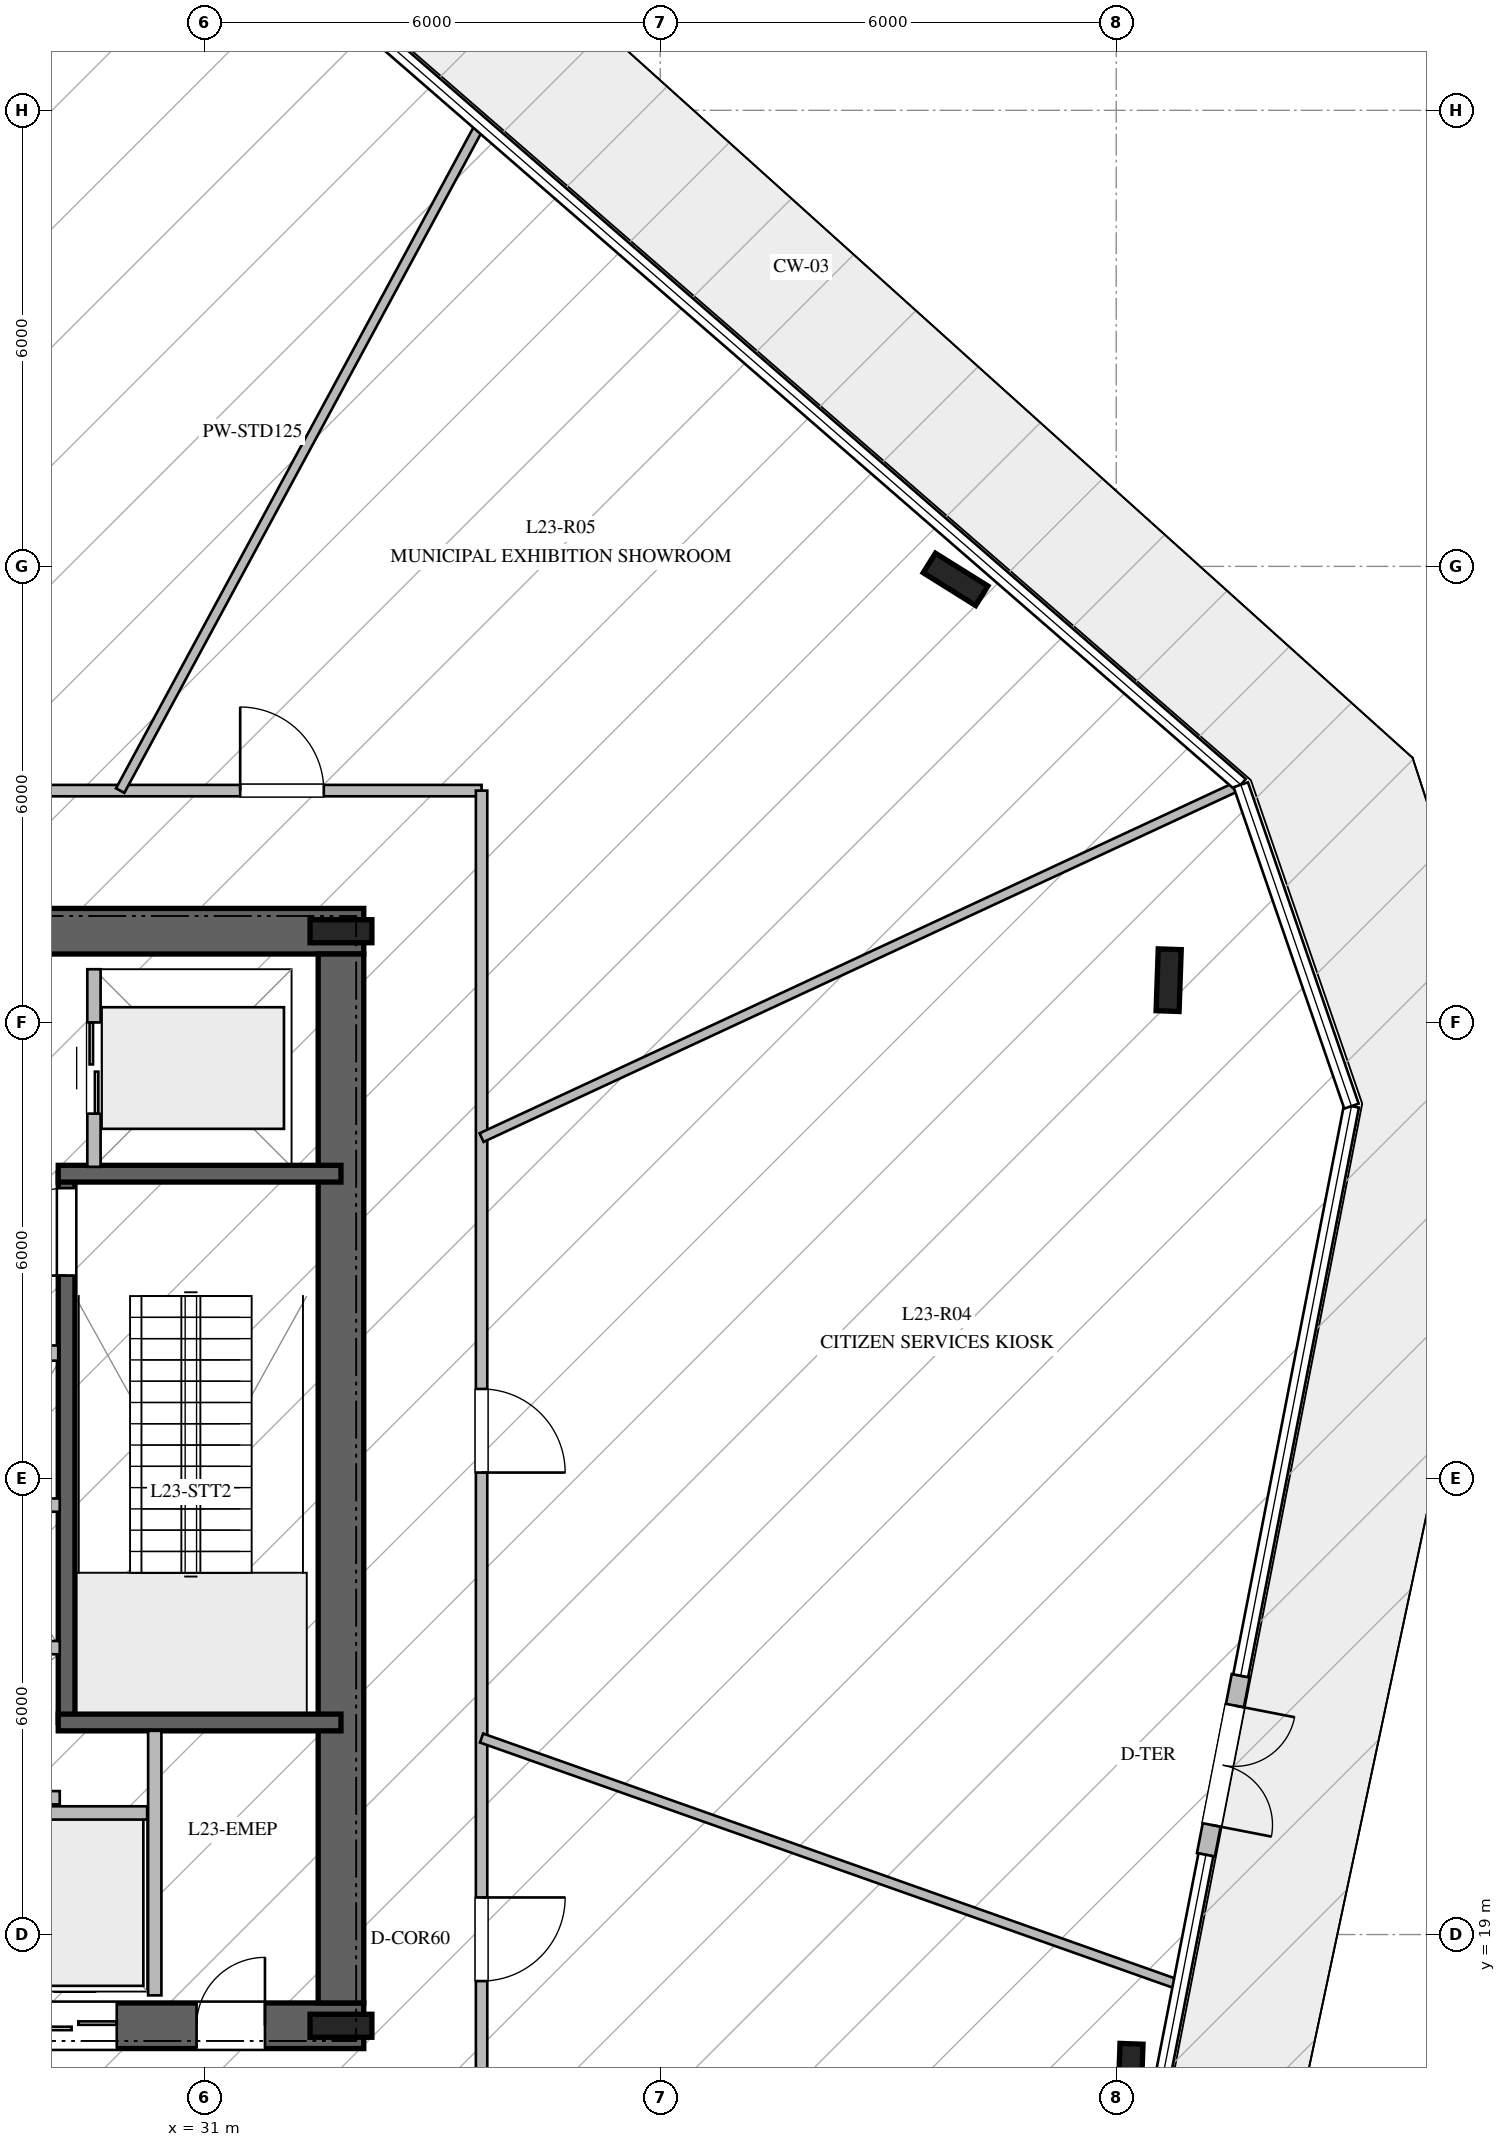
"""IFC4 building model, lengths in metres.
Left out: names, types, materials, properties, quantities, classifications, styles, units other than length and angle.
Written with IfcOpenShell. Run it as: python <this file> out.ifc"""

import sys

from ifc_helpers import new_model, si_unit, direction, frame, frame_2d, origin, origin_2d, place, context, subcontext, project, spatial, rectangle, i_section, extrude, element, fill, save


model = new_model("IFC4")
c1 = context("Model", 3, precision=1e-05, world=origin(), true_north=direction((0.0, 1.0)))
c2 = subcontext(c1, "Body", "Model", "MODEL_VIEW")
j1 = project(units=[si_unit("LENGTHUNIT", "METRE"), si_unit("PLANEANGLEUNIT", "RADIAN")], contexts=[c1])
p1 = place(None, origin())
s1 = spatial("IfcSite", under=j1, at=p1, CompositionType="ELEMENT")
p2 = place(p1, origin())
s2 = spatial("IfcBuilding", under=s1, at=p2, CompositionType="ELEMENT")
p3 = place(p2, frame((0.0, 0.0, 97.4)))
s3 = spatial("IfcBuildingStorey", under=s2, at=p3, CompositionType="ELEMENT", Elevation=97.4)
p4 = place(p3, frame((16.9, 17.8, 0.0), z_axis=(0.0, 0.0, 1.0), x_axis=(1.0, 0.0, 0.0)))
e1 = element("IfcWall", 1, at=p4, inside=s3, PredefinedType="SHEAR", context=c2, shape_type="SweptSolid", body=[
    extrude(rectangle(XDim=16.2, YDim=0.6, at=frame_2d((8.1, 0.0))), origin(), (0.0, 0.0, 1.0), 4.76),
])
p5 = place(p4, frame((5.05, 0.0, 0.0)))
e2 = element("IfcOpeningElement", 2, at=p5, cuts=e1, PredefinedType="OPENING", context=c2, shape_type="SweptSolid", body=[
    extrude(rectangle(XDim=1.2, YDim=2.25, at=frame_2d((0.6, 1.125))), frame((0.0, 0.31, 0.0), z_axis=(0.0, -1.0, 0.0), x_axis=(1.0, 0.0, 0.0)), (0.0, 0.0, 1.0), 0.62),
])
p6 = place(p4, frame((14.0, 0.0, 0.0)))
e3 = element("IfcOpeningElement", 3, at=p6, cuts=e1, PredefinedType="OPENING", context=c2, shape_type="SweptSolid", body=[
    extrude(rectangle(XDim=0.9, YDim=2.1, at=frame_2d((0.45, 1.05))), frame((0.0, 0.31, 0.0), z_axis=(0.0, -1.0, 0.0), x_axis=(1.0, 0.0, 0.0)), (0.0, 0.0, 1.0), 0.62),
])
p7 = place(p4, frame((7.9, 0.0, 0.0)))
e4 = element("IfcOpeningElement", 4, at=p7, cuts=e1, PredefinedType="OPENING", context=c2, shape_type="SweptSolid", body=[
    extrude(rectangle(XDim=1.1, YDim=2.2, at=frame_2d((0.55, 1.1))), frame((0.0, 0.31, 0.0), z_axis=(0.0, -1.0, 0.0), x_axis=(1.0, 0.0, 0.0)), (0.0, 0.0, 1.0), 0.62),
])
p8 = place(p4, frame((9.875, 0.0, 0.0)))
e5 = element("IfcOpeningElement", 5, at=p8, cuts=e1, PredefinedType="OPENING", context=c2, shape_type="SweptSolid", body=[
    extrude(rectangle(XDim=1.1, YDim=2.2, at=frame_2d((0.55, 1.1))), frame((0.0, 0.31, 0.0), z_axis=(0.0, -1.0, 0.0), x_axis=(1.0, 0.0, 0.0)), (0.0, 0.0, 1.0), 0.62),
])
p9 = place(p4, frame((11.85, 0.0, 0.0)))
e6 = element("IfcOpeningElement", 6, at=p9, cuts=e1, PredefinedType="OPENING", context=c2, shape_type="SweptSolid", body=[
    extrude(rectangle(XDim=1.1, YDim=2.2, at=frame_2d((0.55, 1.1))), frame((0.0, 0.31, 0.0), z_axis=(0.0, -1.0, 0.0), x_axis=(1.0, 0.0, 0.0)), (0.0, 0.0, 1.0), 0.62),
])
p10 = place(p3, frame((33.1, 32.2, 0.0), z_axis=(0.0, 0.0, 1.0), x_axis=(-1.0, 0.0, 0.0)))
e7 = element("IfcWall", 7, at=p10, inside=s3, PredefinedType="SHEAR", context=c2, shape_type="SweptSolid", body=[
    extrude(rectangle(XDim=16.2, YDim=0.6, at=frame_2d((8.1, 0.0))), origin(), (0.0, 0.0, 1.0), 4.76),
])
p11 = place(p10, frame((5.05, 0.0, 0.0)))
e8 = element("IfcOpeningElement", 8, at=p11, cuts=e7, PredefinedType="OPENING", context=c2, shape_type="SweptSolid", body=[
    extrude(rectangle(XDim=1.2, YDim=2.25, at=frame_2d((0.6, 1.125))), frame((0.0, 0.31, 0.0), z_axis=(0.0, -1.0, 0.0), x_axis=(1.0, 0.0, 0.0)), (0.0, 0.0, 1.0), 0.62),
])
p12 = place(p10, frame((11.85, 0.0, 0.0)))
e9 = element("IfcOpeningElement", 9, at=p12, cuts=e7, PredefinedType="OPENING", context=c2, shape_type="SweptSolid", body=[
    extrude(rectangle(XDim=1.1, YDim=2.2, at=frame_2d((0.55, 1.1))), frame((0.0, 0.31, 0.0), z_axis=(0.0, -1.0, 0.0), x_axis=(1.0, 0.0, 0.0)), (0.0, 0.0, 1.0), 0.62),
])
p13 = place(p10, frame((9.875, 0.0, 0.0)))
e10 = element("IfcOpeningElement", 10, at=p13, cuts=e7, PredefinedType="OPENING", context=c2, shape_type="SweptSolid", body=[
    extrude(rectangle(XDim=1.1, YDim=2.2, at=frame_2d((0.55, 1.1))), frame((0.0, 0.31, 0.0), z_axis=(0.0, -1.0, 0.0), x_axis=(1.0, 0.0, 0.0)), (0.0, 0.0, 1.0), 0.62),
])
p14 = place(p10, frame((7.9, 0.0, 0.0)))
e11 = element("IfcOpeningElement", 11, at=p14, cuts=e7, PredefinedType="OPENING", context=c2, shape_type="SweptSolid", body=[
    extrude(rectangle(XDim=1.1, YDim=2.2, at=frame_2d((0.55, 1.1))), frame((0.0, 0.31, 0.0), z_axis=(0.0, -1.0, 0.0), x_axis=(1.0, 0.0, 0.0)), (0.0, 0.0, 1.0), 0.62),
])
p15 = place(p3, frame((32.8, 18.1, 0.0), z_axis=(0.0, 0.0, 1.0), x_axis=(0.0, 1.0, 0.0)))
e12 = element("IfcWall", 12, at=p15, inside=s3, PredefinedType="SHEAR", context=c2, shape_type="SweptSolid", body=[
    extrude(rectangle(XDim=13.8, YDim=0.6, at=frame_2d((6.9, 0.0))), origin(), (0.0, 0.0, 1.0), 4.76),
])
for number, where, z_axis, x_axis in (
    (13, (32.8, 17.8, 0.0), (0.0, 0.0, 1.0), (1.0, 0.0, 0.0)),
    (14, (32.8, 32.2, 0.0), (0.0, 0.0, 1.0), (1.0, 0.0, 0.0)),
):
    element("IfcColumn", number, at=place(p3, frame(where, z_axis=z_axis, x_axis=x_axis)), inside=s3, PredefinedType="COLUMN", context=c2, shape_type="SweptSolid", body=[
        extrude(i_section(OverallWidth=0.303, OverallDepth=0.814, WebThickness=0.021, FlangeThickness=0.04, at=origin_2d()), origin(), (0.0, 0.0, 1.0), 5.0),
    ])
p16 = place(p3, frame((29.19, 21.79, 0.0), z_axis=(0.0, 0.0, 1.0), x_axis=(0.0, 1.0, 0.0)))
e15 = element("IfcWall", 15, at=p16, inside=s3, PredefinedType="SOLIDWALL", context=c2, shape_type="SweptSolid", body=[
    extrude(rectangle(XDim=7.22, YDim=0.22, at=frame_2d((3.61, 0.0))), origin(), (0.0, 0.0, 1.0), 4.76),
])
p17 = place(p16, frame((5.88, 0.0, 0.0)))
e16 = element("IfcOpeningElement", 16, at=p17, cuts=e15, PredefinedType="OPENING", context=c2, shape_type="SweptSolid", body=[
    extrude(rectangle(XDim=1.15, YDim=2.2, at=frame_2d((0.575, 1.1))), frame((0.0, 0.12, 0.0), z_axis=(0.0, -1.0, 0.0), x_axis=(1.0, 0.0, 0.0)), (0.0, 0.0, 1.0), 0.24),
])
for number, where, z_axis, x_axis in (
    (17, (29.08, 21.79, 0.0), (0.0, 0.0, 1.0), (1.0, 0.0, 0.0)),
    (18, (29.08, 29.01, 0.0), (0.0, 0.0, 1.0), (1.0, 0.0, 0.0)),
):
    element("IfcWall", number, at=place(p3, frame(where, z_axis=z_axis, x_axis=x_axis)), inside=s3, PredefinedType="SOLIDWALL", context=c2, shape_type="SweptSolid", body=[
        extrude(rectangle(XDim=3.72, YDim=0.22, at=frame_2d((1.86, 0.0))), origin(), (0.0, 0.0, 1.0), 4.76),
    ])
for number, where, z_axis, x_axis in (
    (19, (40.886, 36.829, -0.27), (0.0, 0.0, 1.0), (-0.848, 0.53, 0.0)),
    (20, (43.187, 17.156, -0.27), (0.0, 0.0, 1.0), (0.035, 0.999, 0.0)),
    (21, (43.69, 31.556, -0.27), (0.0, 0.0, 1.0), (0.035, 0.999, 0.0)),
):
    element("IfcColumn", number, at=place(p3, frame(where, z_axis=z_axis, x_axis=x_axis)), inside=s3, PredefinedType="COLUMN", context=c2, shape_type="SweptSolid", body=[
        extrude(i_section(OverallWidth=0.303, OverallDepth=0.814, WebThickness=0.021, FlangeThickness=0.04, at=origin_2d()), origin(), (0.0, 0.0, 1.0), 5.27),
    ])
p18 = place(p3, frame((44.18, 20.049, 0.0), z_axis=(0.0, 0.0, 1.0), x_axis=(0.190831541356, 0.981622800685, 0.0)))
e22 = element("IfcWall", 22, at=p18, inside=s3, PredefinedType="STANDARD", context=c2, shape_type="SweptSolid", body=[
    extrude(rectangle(XDim=2.4, YDim=0.24, at=frame_2d((1.2, 0.0))), origin(), (0.0, 0.0, 1.0), 4.76),
])
p19 = place(p18, frame((0.4, 0.0, 0.0)))
e23 = element("IfcOpeningElement", 23, at=p19, cuts=e22, PredefinedType="OPENING", context=c2, shape_type="SweptSolid", body=[
    extrude(rectangle(XDim=1.6, YDim=2.25, at=frame_2d((0.8, 1.125))), frame((0.0, 0.13, 0.0), z_axis=(0.0, -1.0, 0.0), x_axis=(1.0, 0.0, 0.0)), (0.0, 0.0, 1.0), 0.26),
])
p20 = place(p3, frame((25.7, 26.65, 0.0), z_axis=(0.0, 0.0, 1.0), x_axis=(1.0, 0.0, 0.0)))
e24 = element("IfcWall", 24, at=p20, inside=s3, PredefinedType="PARTITIONING", context=c2, shape_type="SweptSolid", body=[
    extrude(rectangle(XDim=3.38, YDim=0.2, at=frame_2d((1.69, 0.0))), origin(), (0.0, 0.0, 1.0), 4.76),
])
p21 = place(p3, frame((30.35, 18.2, 0.0), z_axis=(0.0, 0.0, 1.0), x_axis=(0.0, 1.0, 0.0)))
e25 = element("IfcWall", 25, at=p21, inside=s3, PredefinedType="PARTITIONING", context=c2, shape_type="SweptSolid", body=[
    extrude(rectangle(XDim=3.48, YDim=0.175, at=frame_2d((1.74, 0.0))), origin(), (0.0, 0.0, 1.0), 4.76),
])
p22 = place(p3, frame((28.35, 20.6, 0.0), z_axis=(0.0, 0.0, 1.0), x_axis=(1.0, 0.0, 0.0)))
e26 = element("IfcWall", 26, at=p22, inside=s3, PredefinedType="PARTITIONING", context=c2, shape_type="SweptSolid", body=[
    extrude(rectangle(XDim=1.9, YDim=0.175, at=frame_2d((0.95, 0.0))), origin(), (0.0, 0.0, 1.0), 4.76),
])
for number, where, z_axis, x_axis in (
    (27, (26.75, 20.8, 0.0), (0.0, 0.0, 1.0), (1.0, 0.0, 0.0)),
    (28, (26.75, 22.775, 0.0), (0.0, 0.0, 1.0), (1.0, 0.0, 0.0)),
    (29, (26.75, 24.65, 0.0), (0.0, 0.0, 1.0), (1.0, 0.0, 0.0)),
):
    element("IfcWall", number, at=place(p3, frame(where, z_axis=z_axis, x_axis=x_axis)), inside=s3, PredefinedType="PARTITIONING", context=c2, shape_type="SweptSolid", body=[
        extrude(rectangle(XDim=2.35, YDim=0.175, at=frame_2d((1.175, 0.0))), origin(), (0.0, 0.0, 1.0), 4.76),
    ])
p23 = place(p3, frame((29.55, 29.1, 0.0), z_axis=(0.0, 0.0, 1.0), x_axis=(0.0, 1.0, 0.0)))
e30 = element("IfcWall", 30, at=p23, inside=s3, PredefinedType="PARTITIONING", context=c2, shape_type="SweptSolid", body=[
    extrude(rectangle(XDim=2.6, YDim=0.175, at=frame_2d((1.3, 0.0))), origin(), (0.0, 0.0, 1.0), 4.76),
])
p24 = place(p23, frame((0.7, 0.0, 0.0)))
e31 = element("IfcOpeningElement", 31, at=p24, cuts=e30, PredefinedType="OPENING", context=c2, shape_type="SweptSolid", body=[
    extrude(rectangle(XDim=1.2, YDim=2.2, at=frame_2d((0.6, 1.1))), frame((0.0, 0.098, 0.0), z_axis=(0.0, -1.0, 0.0), x_axis=(1.0, 0.0, 0.0)), (0.0, 0.0, 1.0), 0.195),
])
p25 = place(p3, frame((15.35, 34.05, 0.0), z_axis=(0.0, 0.0, 1.0), x_axis=(1.0, 0.0, 0.0)))
e32 = element("IfcWall", 32, at=p25, inside=s3, PredefinedType="PARTITIONING", context=c2, shape_type="SweptSolid", body=[
    extrude(rectangle(XDim=19.3, YDim=0.15, at=frame_2d((9.65, 0.0))), origin(), (0.0, 0.0, 1.0), 4.21),
])
p26 = place(p25, frame((16.124, 0.0, 0.0)))
e33 = element("IfcOpeningElement", 33, at=p26, cuts=e32, PredefinedType="OPENING", context=c2, shape_type="SweptSolid", body=[
    extrude(rectangle(XDim=1.1, YDim=2.2, at=frame_2d((0.55, 1.1))), frame((0.0, 0.085, 0.0), z_axis=(0.0, -1.0, 0.0), x_axis=(1.0, 0.0, 0.0)), (0.0, 0.0, 1.0), 0.17),
])
p27 = place(p25, frame((9.194, 0.0, 0.0)))
e34 = element("IfcOpeningElement", 34, at=p27, cuts=e32, PredefinedType="OPENING", context=c2, shape_type="SweptSolid", body=[
    extrude(rectangle(XDim=1.1, YDim=2.2, at=frame_2d((0.55, 1.1))), frame((0.0, 0.085, 0.0), z_axis=(0.0, -1.0, 0.0), x_axis=(1.0, 0.0, 0.0)), (0.0, 0.0, 1.0), 0.17),
])
p28 = place(p25, frame((2.083, 0.0, 0.0)))
e35 = element("IfcOpeningElement", 35, at=p28, cuts=e32, PredefinedType="OPENING", context=c2, shape_type="SweptSolid", body=[
    extrude(rectangle(XDim=1.1, YDim=2.2, at=frame_2d((0.55, 1.1))), frame((0.0, 0.085, 0.0), z_axis=(0.0, -1.0, 0.0), x_axis=(1.0, 0.0, 0.0)), (0.0, 0.0, 1.0), 0.17),
])
p29 = place(p3, frame((34.65, 34.05, 0.0), z_axis=(0.0, 0.0, 1.0), x_axis=(0.0, -1.0, 0.0)))
e36 = element("IfcWall", 36, at=p29, inside=s3, PredefinedType="PARTITIONING", context=c2, shape_type="SweptSolid", body=[
    extrude(rectangle(XDim=18.1, YDim=0.15, at=frame_2d((9.05, 0.0))), origin(), (0.0, 0.0, 1.0), 4.21),
])
p30 = place(p29, frame((14.562, 0.0, 0.0)))
e37 = element("IfcOpeningElement", 37, at=p30, cuts=e36, PredefinedType="OPENING", context=c2, shape_type="SweptSolid", body=[
    extrude(rectangle(XDim=1.1, YDim=2.2, at=frame_2d((0.55, 1.1))), frame((0.0, 0.085, 0.0), z_axis=(0.0, -1.0, 0.0), x_axis=(1.0, 0.0, 0.0)), (0.0, 0.0, 1.0), 0.17),
])
p31 = place(p29, frame((7.872, 0.0, 0.0)))
e38 = element("IfcOpeningElement", 38, at=p31, cuts=e36, PredefinedType="OPENING", context=c2, shape_type="SweptSolid", body=[
    extrude(rectangle(XDim=1.1, YDim=2.2, at=frame_2d((0.55, 1.1))), frame((0.0, 0.085, 0.0), z_axis=(0.0, -1.0, 0.0), x_axis=(1.0, 0.0, 0.0)), (0.0, 0.0, 1.0), 0.17),
])
p32 = place(p3, frame((29.895, 34.05, 0.0), z_axis=(0.0, 0.0, 1.0), x_axis=(0.475710951227, 0.87960166603, 0.0)))
e39 = element("IfcWall", 39, at=p32, inside=s3, PredefinedType="PARTITIONING", context=c2, shape_type="SweptSolid", body=[
    extrude(rectangle(XDim=9.953, YDim=0.125, at=frame_2d((4.977, 0.0))), origin(), (0.0, 0.0, 1.0), 4.02),
])
p33 = place(p3, frame((34.65, 21.585, 0.0), z_axis=(0.0, 0.0, 1.0), x_axis=(0.94273270397, -0.333549170087, 0.0)))
e40 = element("IfcWall", 40, at=p33, inside=s3, PredefinedType="PARTITIONING", context=c2, shape_type="SweptSolid", body=[
    extrude(rectangle(XDim=9.738, YDim=0.125, at=frame_2d((4.869, 0.0))), origin(), (0.0, 0.0, 1.0), 4.16),
])
p34 = place(p3, frame((34.65, 29.485, 0.0), z_axis=(0.0, 0.0, 1.0), x_axis=(0.90687505581, 0.421399612184, 0.0)))
e41 = element("IfcWall", 41, at=p34, inside=s3, PredefinedType="PARTITIONING", context=c2, shape_type="SweptSolid", body=[
    extrude(rectangle(XDim=10.996, YDim=0.125, at=frame_2d((5.498, 0.0))), origin(), (0.0, 0.0, 1.0), 4.16),
])
p35 = place(p19, frame((1.6, 0.0, 0.0), z_axis=(0.0, 0.0, 1.0), x_axis=(-1.0, 0.0, 0.0)))
e42 = element("IfcDoor", 42, at=p35, inside=s3, OperationType="DOUBLE_DOOR_SINGLE_SWING", PredefinedType="DOOR", context=c2, shape_type="SweptSolid", body=[
    extrude(rectangle(XDim=1.6, YDim=2.25, at=frame_2d((0.8, 1.125))), frame((0.0, 0.025, 0.0), z_axis=(0.0, -1.0, 0.0), x_axis=(1.0, 0.0, 0.0)), (0.0, 0.0, 1.0), 0.05),
])
fill(e23, e42)
p36 = place(p17, origin())
e43 = element("IfcDoor", 43, at=p36, inside=s3, OperationType="SINGLE_SWING_LEFT", PredefinedType="DOOR", context=c2, shape_type="SweptSolid", body=[
    extrude(rectangle(XDim=1.15, YDim=2.2, at=frame_2d((0.575, 1.1))), frame((0.0, 0.025, 0.0), z_axis=(0.0, -1.0, 0.0), x_axis=(1.0, 0.0, 0.0)), (0.0, 0.0, 1.0), 0.05),
])
fill(e16, e43)
p37 = place(p6, origin())
e44 = element("IfcDoor", 44, at=p37, inside=s3, OperationType="SINGLE_SWING_RIGHT", PredefinedType="DOOR", context=c2, shape_type="SweptSolid", body=[
    extrude(rectangle(XDim=0.9, YDim=2.1, at=frame_2d((0.45, 1.05))), frame((0.0, 0.025, 0.0), z_axis=(0.0, -1.0, 0.0), x_axis=(1.0, 0.0, 0.0)), (0.0, 0.0, 1.0), 0.05),
])
fill(e3, e44)
p38 = place(p9, origin())
e45 = element("IfcDoor", 45, at=p38, inside=s3, OperationType="DOUBLE_DOOR_SLIDING", PredefinedType="DOOR", context=c2, shape_type="SweptSolid", body=[
    extrude(rectangle(XDim=1.1, YDim=2.2, at=frame_2d((0.55, 1.1))), frame((0.0, 0.025, 0.0), z_axis=(0.0, -1.0, 0.0), x_axis=(1.0, 0.0, 0.0)), (0.0, 0.0, 1.0), 0.05),
])
fill(e6, e45)
p39 = place(p24, origin())
e46 = element("IfcDoor", 46, at=p39, inside=s3, OperationType="DOUBLE_DOOR_SLIDING", PredefinedType="DOOR", context=c2, shape_type="SweptSolid", body=[
    extrude(rectangle(XDim=1.2, YDim=2.2, at=frame_2d((0.6, 1.1))), frame((0.0, 0.025, 0.0), z_axis=(0.0, -1.0, 0.0), x_axis=(1.0, 0.0, 0.0)), (0.0, 0.0, 1.0), 0.05),
])
fill(e31, e46)
p40 = place(p30, origin())
e47 = element("IfcDoor", 47, at=p40, inside=s3, OperationType="SINGLE_SWING_LEFT", PredefinedType="DOOR", context=c2, shape_type="SweptSolid", body=[
    extrude(rectangle(XDim=1.1, YDim=2.2, at=frame_2d((0.55, 1.1))), frame((0.0, 0.025, 0.0), z_axis=(0.0, -1.0, 0.0), x_axis=(1.0, 0.0, 0.0)), (0.0, 0.0, 1.0), 0.05),
])
fill(e37, e47)
p41 = place(p31, origin())
e48 = element("IfcDoor", 48, at=p41, inside=s3, OperationType="SINGLE_SWING_RIGHT", PredefinedType="DOOR", context=c2, shape_type="SweptSolid", body=[
    extrude(rectangle(XDim=1.1, YDim=2.2, at=frame_2d((0.55, 1.1))), frame((0.0, 0.025, 0.0), z_axis=(0.0, -1.0, 0.0), x_axis=(1.0, 0.0, 0.0)), (0.0, 0.0, 1.0), 0.05),
])
fill(e38, e48)
p42 = place(p26, origin())
e49 = element("IfcDoor", 49, at=p42, inside=s3, OperationType="SINGLE_SWING_LEFT", PredefinedType="DOOR", context=c2, shape_type="SweptSolid", body=[
    extrude(rectangle(XDim=1.1, YDim=2.2, at=frame_2d((0.55, 1.1))), frame((0.0, 0.025, 0.0), z_axis=(0.0, -1.0, 0.0), x_axis=(1.0, 0.0, 0.0)), (0.0, 0.0, 1.0), 0.05),
])
fill(e33, e49)
save(model, sys.argv[1])
